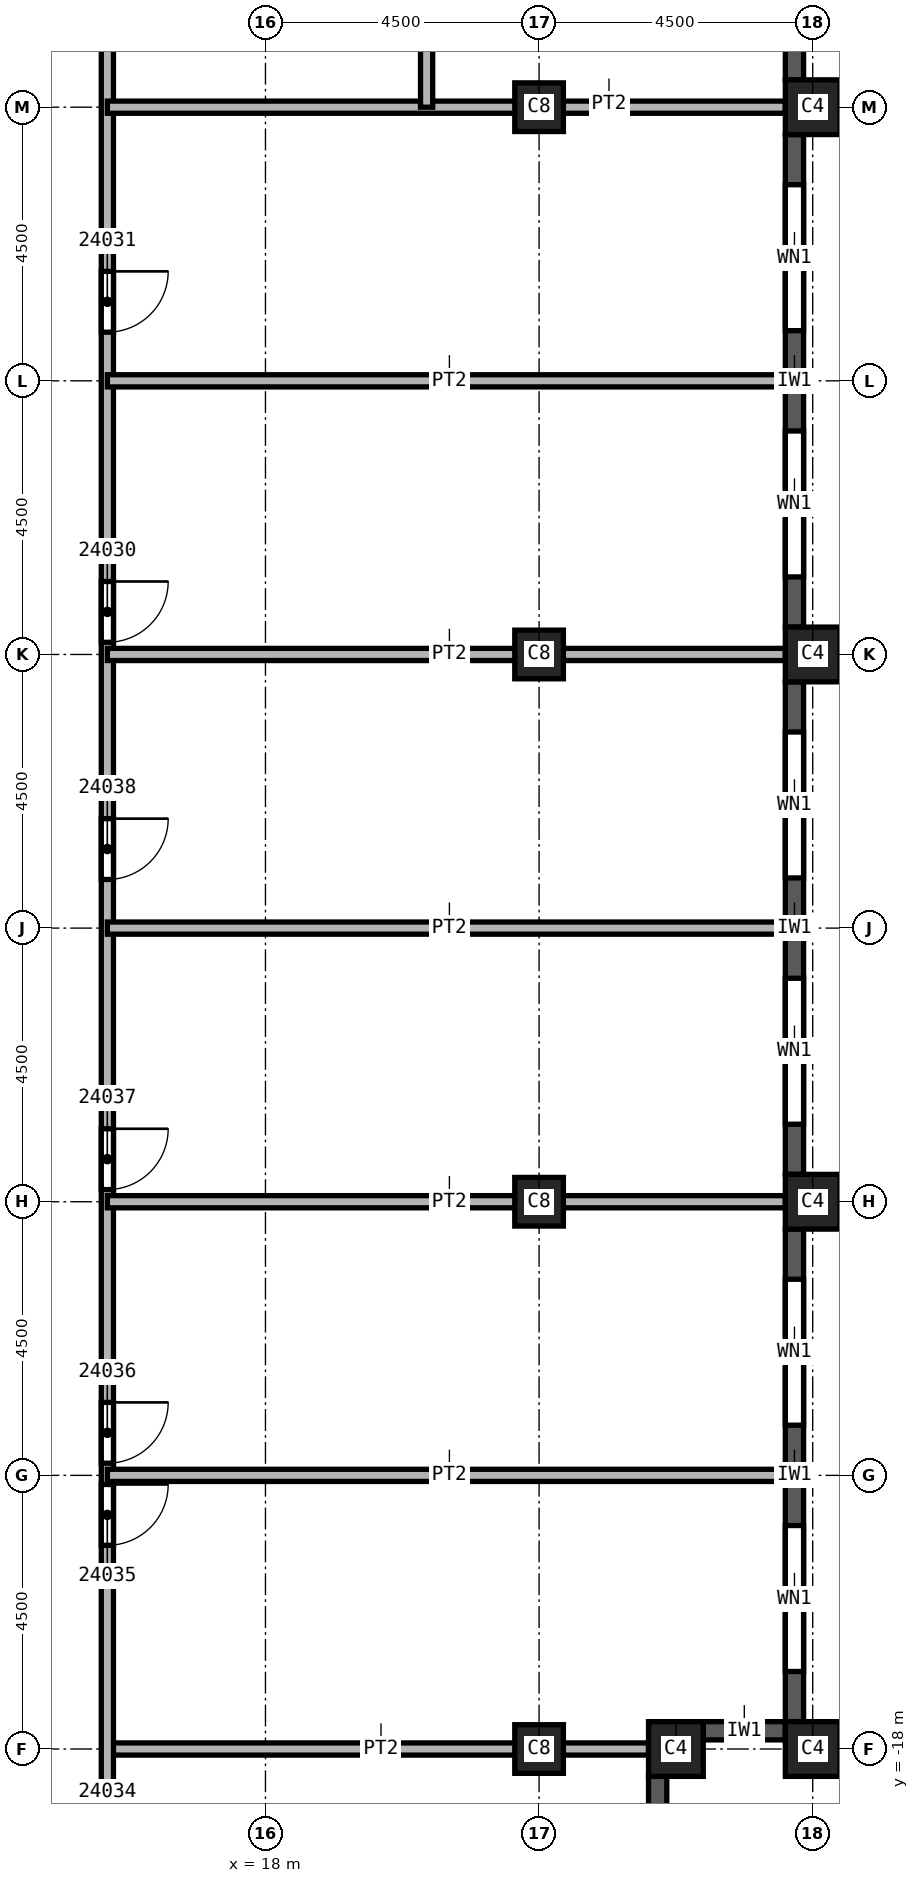
"""IFC4 building model, lengths in metres.
Left out: names, types, materials, properties, quantities, classifications, styles, units other than length and angle.
Written with IfcOpenShell. Run it as: python <this file> out.ifc"""

import sys

from ifc_helpers import new_model, si_unit, direction, frame, frame_2d, origin, origin_2d, place, context, subcontext, project, spatial, rectangle, extrude, element, fill, save


model = new_model("IFC4")
c1 = context("Model", 3, precision=1e-05, world=origin(), true_north=direction((0.0, 1.0)))
c2 = subcontext(c1, "Body", "Model", "MODEL_VIEW")
j1 = project(units=[si_unit("LENGTHUNIT", "METRE"), si_unit("PLANEANGLEUNIT", "RADIAN")], contexts=[c1])
p1 = place(None, origin())
s1 = spatial("IfcSite", under=j1, at=p1, CompositionType="ELEMENT")
p2 = place(p1, origin())
s2 = spatial("IfcBuilding", under=s1, at=p2, CompositionType="ELEMENT")
p3 = place(p2, frame((0.0, 0.0, 346.0)))
s3 = spatial("IfcBuildingStorey", under=s2, at=p3, CompositionType="ELEMENT", Elevation=346.0)
for number, where, z_axis, x_axis in (
    (1, (22.5, 0.0, 0.0), (0.0, 0.0, 1.0), (1.0, 0.0, 0.0)),
    (2, (22.5, 9.0, 0.0), (0.0, 0.0, 1.0), (1.0, 0.0, 0.0)),
    (3, (22.5, -9.0, 0.0), (0.0, 0.0, 1.0), (1.0, 0.0, 0.0)),
    (4, (22.5, -18.0, 0.0), (0.0, 0.0, 1.0), (1.0, 0.0, 0.0)),
):
    element("IfcColumn", number, at=place(p3, frame(where, z_axis=z_axis, x_axis=x_axis)), inside=s3, PredefinedType="COLUMN", context=c2, shape_type="SweptSolid", body=[
        extrude(rectangle(XDim=0.8, YDim=0.8, at=origin_2d()), origin(), (0.0, 0.0, 1.0), 3.59),
    ])
for number, where, z_axis, x_axis in (
    (5, (27.0, 0.0, 0.0), (0.0, 0.0, 1.0), (0.0, 1.0, 0.0)),
    (6, (27.0, 9.0, 0.0), (0.0, 0.0, 1.0), (0.0, 1.0, 0.0)),
    (7, (27.0, -9.0, 0.0), (0.0, 0.0, 1.0), (0.0, 1.0, 0.0)),
    (8, (27.0, -18.0, 0.0), (0.0, 0.0, 1.0), (0.0, 1.0, 0.0)),
    (9, (24.75, -18.0, 0.0), (0.0, 0.0, 1.0), (1.0, 0.0, 0.0)),
):
    element("IfcColumn", number, at=place(p3, frame(where, z_axis=z_axis, x_axis=x_axis)), inside=s3, PredefinedType="COLUMN", context=c2, shape_type="SweptSolid", body=[
        extrude(rectangle(XDim=0.9, YDim=0.9, at=origin_2d()), origin(), (0.0, 0.0, 1.0), 3.59),
    ])
p4 = place(p3, frame((24.45, -21.25, 0.0), z_axis=(0.0, 0.0, 1.0), x_axis=(0.0, 1.0, 0.0)))
e10 = element("IfcWall", 10, at=p4, inside=s3, PredefinedType="SOLIDWALL", context=c2, shape_type="SweptSolid", body=[
    extrude(rectangle(XDim=2.8, YDim=0.3, at=frame_2d((1.4, 0.0))), origin(), (0.0, 0.0, 1.0), 2.99),
])
p5 = place(p3, frame((25.2, -17.7, 0.0), z_axis=(0.0, 0.0, 1.0), x_axis=(1.0, 0.0, 0.0)))
e11 = element("IfcWall", 11, at=p5, inside=s3, PredefinedType="SOLIDWALL", context=c2, shape_type="SweptSolid", body=[
    extrude(rectangle(XDim=1.35, YDim=0.3, at=frame_2d((0.675, 0.0))), origin(), (0.0, 0.0, 1.0), 2.99),
])
p6 = place(p3, frame((26.7, -17.55, 0.0), z_axis=(0.0, 0.0, 1.0), x_axis=(0.0, 1.0, 0.0)))
e12 = element("IfcWall", 12, at=p6, inside=s3, PredefinedType="SOLIDWALL", context=c2, shape_type="SweptSolid", body=[
    extrude(rectangle(XDim=8.1, YDim=0.3, at=frame_2d((4.05, 0.0))), origin(), (0.0, 0.0, 1.0), 2.99),
])
p7 = place(p6, frame((0.825, 0.0, 0.8)))
e13 = element("IfcOpeningElement", 13, at=p7, cuts=e12, PredefinedType="OPENING", context=c2, shape_type="SweptSolid", body=[
    extrude(rectangle(XDim=2.4, YDim=1.95, at=frame_2d((1.2, 0.975))), frame((0.0, 0.15, 0.0), z_axis=(0.0, -1.0, 0.0), x_axis=(1.0, 0.0, 0.0)), (0.0, 0.0, 1.0), 0.3),
])
p8 = place(p6, frame((4.875, 0.0, 0.8)))
e14 = element("IfcOpeningElement", 14, at=p8, cuts=e12, PredefinedType="OPENING", context=c2, shape_type="SweptSolid", body=[
    extrude(rectangle(XDim=2.4, YDim=1.95, at=frame_2d((1.2, 0.975))), frame((0.0, 0.15, 0.0), z_axis=(0.0, -1.0, 0.0), x_axis=(1.0, 0.0, 0.0)), (0.0, 0.0, 1.0), 0.3),
])
p9 = place(p3, frame((26.7, -8.55, 0.0), z_axis=(0.0, 0.0, 1.0), x_axis=(0.0, 1.0, 0.0)))
e15 = element("IfcWall", 15, at=p9, inside=s3, PredefinedType="SOLIDWALL", context=c2, shape_type="SweptSolid", body=[
    extrude(rectangle(XDim=8.1, YDim=0.3, at=frame_2d((4.05, 0.0))), origin(), (0.0, 0.0, 1.0), 2.99),
])
p10 = place(p9, frame((0.825, 0.0, 0.8)))
e16 = element("IfcOpeningElement", 16, at=p10, cuts=e15, PredefinedType="OPENING", context=c2, shape_type="SweptSolid", body=[
    extrude(rectangle(XDim=2.4, YDim=1.95, at=frame_2d((1.2, 0.975))), frame((0.0, 0.15, 0.0), z_axis=(0.0, -1.0, 0.0), x_axis=(1.0, 0.0, 0.0)), (0.0, 0.0, 1.0), 0.3),
])
p11 = place(p9, frame((4.875, 0.0, 0.8)))
e17 = element("IfcOpeningElement", 17, at=p11, cuts=e15, PredefinedType="OPENING", context=c2, shape_type="SweptSolid", body=[
    extrude(rectangle(XDim=2.4, YDim=1.95, at=frame_2d((1.2, 0.975))), frame((0.0, 0.15, 0.0), z_axis=(0.0, -1.0, 0.0), x_axis=(1.0, 0.0, 0.0)), (0.0, 0.0, 1.0), 0.3),
])
p12 = place(p3, frame((26.7, 0.45, 0.0), z_axis=(0.0, 0.0, 1.0), x_axis=(0.0, 1.0, 0.0)))
e18 = element("IfcWall", 18, at=p12, inside=s3, PredefinedType="SOLIDWALL", context=c2, shape_type="SweptSolid", body=[
    extrude(rectangle(XDim=8.1, YDim=0.3, at=frame_2d((4.05, 0.0))), origin(), (0.0, 0.0, 1.0), 2.99),
])
p13 = place(p12, frame((0.825, 0.0, 0.8)))
e19 = element("IfcOpeningElement", 19, at=p13, cuts=e18, PredefinedType="OPENING", context=c2, shape_type="SweptSolid", body=[
    extrude(rectangle(XDim=2.4, YDim=1.95, at=frame_2d((1.2, 0.975))), frame((0.0, 0.15, 0.0), z_axis=(0.0, -1.0, 0.0), x_axis=(1.0, 0.0, 0.0)), (0.0, 0.0, 1.0), 0.3),
])
p14 = place(p12, frame((4.875, 0.0, 0.8)))
e20 = element("IfcOpeningElement", 20, at=p14, cuts=e18, PredefinedType="OPENING", context=c2, shape_type="SweptSolid", body=[
    extrude(rectangle(XDim=2.4, YDim=1.95, at=frame_2d((1.2, 0.975))), frame((0.0, 0.15, 0.0), z_axis=(0.0, -1.0, 0.0), x_axis=(1.0, 0.0, 0.0)), (0.0, 0.0, 1.0), 0.3),
])
p15 = place(p3, frame((26.7, 9.45, 0.0), z_axis=(0.0, 0.0, 1.0), x_axis=(0.0, 1.0, 0.0)))
e21 = element("IfcWall", 21, at=p15, inside=s3, PredefinedType="SOLIDWALL", context=c2, shape_type="SweptSolid", body=[
    extrude(rectangle(XDim=8.1, YDim=0.3, at=frame_2d((4.05, 0.0))), origin(), (0.0, 0.0, 1.0), 2.99),
])
p16 = place(p15, frame((0.825, 0.0, 0.8)))
e22 = element("IfcOpeningElement", 22, at=p16, cuts=e21, PredefinedType="OPENING", context=c2, shape_type="SweptSolid", body=[
    extrude(rectangle(XDim=2.4, YDim=1.95, at=frame_2d((1.2, 0.975))), frame((0.0, 0.15, 0.0), z_axis=(0.0, -1.0, 0.0), x_axis=(1.0, 0.0, 0.0)), (0.0, 0.0, 1.0), 0.3),
])
p17 = place(p15, frame((4.875, 0.0, 0.8)))
e23 = element("IfcOpeningElement", 23, at=p17, cuts=e21, PredefinedType="OPENING", context=c2, shape_type="SweptSolid", body=[
    extrude(rectangle(XDim=2.4, YDim=1.95, at=frame_2d((1.2, 0.975))), frame((0.0, 0.15, 0.0), z_axis=(0.0, -1.0, 0.0), x_axis=(1.0, 0.0, 0.0)), (0.0, 0.0, 1.0), 0.3),
])
p18 = place(p3, frame((15.4, -18.0, 0.0), z_axis=(0.0, 0.0, 1.0), x_axis=(1.0, 0.0, 0.0)))
e24 = element("IfcWall", 24, at=p18, inside=s3, PredefinedType="PARTITIONING", context=c2, shape_type="SweptSolid", body=[
    extrude(rectangle(XDim=8.9, YDim=0.2, at=frame_2d((4.45, 0.0))), origin(), (0.0, 0.0, 1.0), 3.59),
])
p19 = place(p3, frame((15.4, 24.95, 0.0), z_axis=(0.0, 0.0, 1.0), x_axis=(0.0, -1.0, 0.0)))
e25 = element("IfcWall", 25, at=p19, inside=s3, PredefinedType="PARTITIONING", context=c2, shape_type="SweptSolid", body=[
    extrude(rectangle(XDim=49.9, YDim=0.2, at=frame_2d((24.95, 0.0))), origin(), (0.0, 0.0, 1.0), 3.59),
])
p20 = place(p19, frame((23.75, 0.0, 0.0)))
e26 = element("IfcOpeningElement", 26, at=p20, cuts=e25, PredefinedType="OPENING", context=c2, shape_type="SweptSolid", body=[
    extrude(rectangle(XDim=1.0, YDim=2.1, at=frame_2d((0.5, 1.05))), frame((0.0, 0.1, 0.0), z_axis=(0.0, -1.0, 0.0), x_axis=(1.0, 0.0, 0.0)), (0.0, 0.0, 1.0), 0.2),
])
p21 = place(p19, frame((18.65, 0.0, 0.0)))
e27 = element("IfcOpeningElement", 27, at=p21, cuts=e25, PredefinedType="OPENING", context=c2, shape_type="SweptSolid", body=[
    extrude(rectangle(XDim=1.0, YDim=2.1, at=frame_2d((0.5, 1.05))), frame((0.0, 0.1, 0.0), z_axis=(0.0, -1.0, 0.0), x_axis=(1.0, 0.0, 0.0)), (0.0, 0.0, 1.0), 0.2),
])
p22 = place(p19, frame((7.45, 0.0, 0.0)))
e28 = element("IfcOpeningElement", 28, at=p22, cuts=e25, PredefinedType="OPENING", context=c2, shape_type="SweptSolid", body=[
    extrude(rectangle(XDim=1.0, YDim=2.1, at=frame_2d((0.5, 1.05))), frame((0.0, 0.1, 0.0), z_axis=(0.0, -1.0, 0.0), x_axis=(1.0, 0.0, 0.0)), (0.0, 0.0, 1.0), 0.2),
])
p23 = place(p19, frame((44.15, 0.0, 0.0)))
e29 = element("IfcOpeningElement", 29, at=p23, cuts=e25, PredefinedType="OPENING", context=c2, shape_type="SweptSolid", body=[
    extrude(rectangle(XDim=1.0, YDim=2.1, at=frame_2d((0.5, 1.05))), frame((0.0, 0.1, 0.0), z_axis=(0.0, -1.0, 0.0), x_axis=(1.0, 0.0, 0.0)), (0.0, 0.0, 1.0), 0.2),
])
p24 = place(p19, frame((38.6, 0.0, 0.0)))
e30 = element("IfcOpeningElement", 30, at=p24, cuts=e25, PredefinedType="OPENING", context=c2, shape_type="SweptSolid", body=[
    extrude(rectangle(XDim=1.0, YDim=2.1, at=frame_2d((0.5, 1.05))), frame((0.0, 0.1, 0.0), z_axis=(0.0, -1.0, 0.0), x_axis=(1.0, 0.0, 0.0)), (0.0, 0.0, 1.0), 0.2),
])
p25 = place(p19, frame((37.25, 0.0, 0.0)))
e31 = element("IfcOpeningElement", 31, at=p25, cuts=e25, PredefinedType="OPENING", context=c2, shape_type="SweptSolid", body=[
    extrude(rectangle(XDim=1.0, YDim=2.1, at=frame_2d((0.5, 1.05))), frame((0.0, 0.1, 0.0), z_axis=(0.0, -1.0, 0.0), x_axis=(1.0, 0.0, 0.0)), (0.0, 0.0, 1.0), 0.2),
])
p26 = place(p19, frame((32.75, 0.0, 0.0)))
e32 = element("IfcOpeningElement", 32, at=p26, cuts=e25, PredefinedType="OPENING", context=c2, shape_type="SweptSolid", body=[
    extrude(rectangle(XDim=1.0, YDim=2.1, at=frame_2d((0.5, 1.05))), frame((0.0, 0.1, 0.0), z_axis=(0.0, -1.0, 0.0), x_axis=(1.0, 0.0, 0.0)), (0.0, 0.0, 1.0), 0.2),
])
p27 = place(p19, frame((27.65, 0.0, 0.0)))
e33 = element("IfcOpeningElement", 33, at=p27, cuts=e25, PredefinedType="OPENING", context=c2, shape_type="SweptSolid", body=[
    extrude(rectangle(XDim=1.0, YDim=2.1, at=frame_2d((0.5, 1.05))), frame((0.0, 0.1, 0.0), z_axis=(0.0, -1.0, 0.0), x_axis=(1.0, 0.0, 0.0)), (0.0, 0.0, 1.0), 0.2),
])
for number, where, z_axis, x_axis in (
    (34, (15.4, -13.5, 0.0), (0.0, 0.0, 1.0), (1.0, 0.0, 0.0)),
    (35, (15.4, -9.0, 0.0), (0.0, 0.0, 1.0), (1.0, 0.0, 0.0)),
    (36, (15.4, -4.5, 0.0), (0.0, 0.0, 1.0), (1.0, 0.0, 0.0)),
    (37, (15.4, 4.5, 0.0), (0.0, 0.0, 1.0), (1.0, 0.0, 0.0)),
    (38, (15.4, 9.0, 0.0), (0.0, 0.0, 1.0), (1.0, 0.0, 0.0)),
):
    element("IfcWall", number, at=place(p3, frame(where, z_axis=z_axis, x_axis=x_axis)), inside=s3, PredefinedType="PARTITIONING", context=c2, shape_type="SweptSolid", body=[
        extrude(rectangle(XDim=11.15, YDim=0.2, at=frame_2d((5.575, 0.0))), origin(), (0.0, 0.0, 1.0), 3.59),
    ])
p28 = place(p3, frame((20.65, 24.95, 0.0), z_axis=(0.0, 0.0, 1.0), x_axis=(0.0, -1.0, 0.0)))
e39 = element("IfcWall", 39, at=p28, inside=s3, PredefinedType="PARTITIONING", context=c2, shape_type="SweptSolid", body=[
    extrude(rectangle(XDim=15.95, YDim=0.2, at=frame_2d((7.975, 0.0))), origin(), (0.0, 0.0, 1.0), 3.59),
])
p29 = place(p28, frame((7.75, 0.0, 0.0)))
e40 = element("IfcOpeningElement", 40, at=p29, cuts=e39, PredefinedType="OPENING", context=c2, shape_type="SweptSolid", body=[
    extrude(rectangle(XDim=1.0, YDim=2.1, at=frame_2d((0.5, 1.05))), frame((0.0, 0.1, 0.0), z_axis=(0.0, -1.0, 0.0), x_axis=(1.0, 0.0, 0.0)), (0.0, 0.0, 1.0), 0.2),
])
p30 = place(p3, frame((26.55, 0.0, 0.0), z_axis=(0.0, 0.0, 1.0), x_axis=(-1.0, 0.0, 0.0)))
e41 = element("IfcWall", 41, at=p30, inside=s3, PredefinedType="PARTITIONING", context=c2, shape_type="SweptSolid", body=[
    extrude(rectangle(XDim=11.15, YDim=0.2, at=frame_2d((5.575, 0.0))), origin(), (0.0, 0.0, 1.0), 3.59),
])
p31 = place(p7, origin())
e42 = element("IfcWindow", 42, at=p31, inside=s3, PartitioningType="SINGLE_PANEL", PredefinedType="WINDOW", context=c2, shape_type="SweptSolid", body=[
    extrude(rectangle(XDim=2.4, YDim=1.95, at=frame_2d((1.2, 0.975))), frame((0.0, 0.03, 0.0), z_axis=(0.0, -1.0, 0.0), x_axis=(1.0, 0.0, 0.0)), (0.0, 0.0, 1.0), 0.06),
])
fill(e13, e42)
p32 = place(p8, origin())
e43 = element("IfcWindow", 43, at=p32, inside=s3, PartitioningType="SINGLE_PANEL", PredefinedType="WINDOW", context=c2, shape_type="SweptSolid", body=[
    extrude(rectangle(XDim=2.4, YDim=1.95, at=frame_2d((1.2, 0.975))), frame((0.0, 0.03, 0.0), z_axis=(0.0, -1.0, 0.0), x_axis=(1.0, 0.0, 0.0)), (0.0, 0.0, 1.0), 0.06),
])
fill(e14, e43)
p33 = place(p10, origin())
e44 = element("IfcWindow", 44, at=p33, inside=s3, PartitioningType="SINGLE_PANEL", PredefinedType="WINDOW", context=c2, shape_type="SweptSolid", body=[
    extrude(rectangle(XDim=2.4, YDim=1.95, at=frame_2d((1.2, 0.975))), frame((0.0, 0.03, 0.0), z_axis=(0.0, -1.0, 0.0), x_axis=(1.0, 0.0, 0.0)), (0.0, 0.0, 1.0), 0.06),
])
fill(e16, e44)
p34 = place(p11, origin())
e45 = element("IfcWindow", 45, at=p34, inside=s3, PartitioningType="SINGLE_PANEL", PredefinedType="WINDOW", context=c2, shape_type="SweptSolid", body=[
    extrude(rectangle(XDim=2.4, YDim=1.95, at=frame_2d((1.2, 0.975))), frame((0.0, 0.03, 0.0), z_axis=(0.0, -1.0, 0.0), x_axis=(1.0, 0.0, 0.0)), (0.0, 0.0, 1.0), 0.06),
])
fill(e17, e45)
p35 = place(p13, origin())
e46 = element("IfcWindow", 46, at=p35, inside=s3, PartitioningType="SINGLE_PANEL", PredefinedType="WINDOW", context=c2, shape_type="SweptSolid", body=[
    extrude(rectangle(XDim=2.4, YDim=1.95, at=frame_2d((1.2, 0.975))), frame((0.0, 0.03, 0.0), z_axis=(0.0, -1.0, 0.0), x_axis=(1.0, 0.0, 0.0)), (0.0, 0.0, 1.0), 0.06),
])
fill(e19, e46)
p36 = place(p14, origin())
e47 = element("IfcWindow", 47, at=p36, inside=s3, PartitioningType="SINGLE_PANEL", PredefinedType="WINDOW", context=c2, shape_type="SweptSolid", body=[
    extrude(rectangle(XDim=2.4, YDim=1.95, at=frame_2d((1.2, 0.975))), frame((0.0, 0.03, 0.0), z_axis=(0.0, -1.0, 0.0), x_axis=(1.0, 0.0, 0.0)), (0.0, 0.0, 1.0), 0.06),
])
fill(e20, e47)
p37 = place(p20, origin())
e48 = element("IfcDoor", 48, at=p37, inside=s3, OperationType="SINGLE_SWING_LEFT", PredefinedType="DOOR", context=c2, shape_type="SweptSolid", body=[
    extrude(rectangle(XDim=1.0, YDim=2.1, at=frame_2d((0.5, 1.05))), frame((0.0, 0.025, 0.0), z_axis=(0.0, -1.0, 0.0), x_axis=(1.0, 0.0, 0.0)), (0.0, 0.0, 1.0), 0.05),
])
fill(e26, e48)
p38 = place(p21, origin())
e49 = element("IfcDoor", 49, at=p38, inside=s3, OperationType="SINGLE_SWING_RIGHT", PredefinedType="DOOR", context=c2, shape_type="SweptSolid", body=[
    extrude(rectangle(XDim=1.0, YDim=2.1, at=frame_2d((0.5, 1.05))), frame((0.0, 0.025, 0.0), z_axis=(0.0, -1.0, 0.0), x_axis=(1.0, 0.0, 0.0)), (0.0, 0.0, 1.0), 0.05),
])
fill(e27, e49)
p39 = place(p24, origin())
e50 = element("IfcDoor", 50, at=p39, inside=s3, OperationType="SINGLE_SWING_RIGHT", PredefinedType="DOOR", context=c2, shape_type="SweptSolid", body=[
    extrude(rectangle(XDim=1.0, YDim=2.1, at=frame_2d((0.5, 1.05))), frame((0.0, 0.025, 0.0), z_axis=(0.0, -1.0, 0.0), x_axis=(1.0, 0.0, 0.0)), (0.0, 0.0, 1.0), 0.05),
])
fill(e30, e50)
p40 = place(p25, origin())
e51 = element("IfcDoor", 51, at=p40, inside=s3, OperationType="SINGLE_SWING_LEFT", PredefinedType="DOOR", context=c2, shape_type="SweptSolid", body=[
    extrude(rectangle(XDim=1.0, YDim=2.1, at=frame_2d((0.5, 1.05))), frame((0.0, 0.025, 0.0), z_axis=(0.0, -1.0, 0.0), x_axis=(1.0, 0.0, 0.0)), (0.0, 0.0, 1.0), 0.05),
])
fill(e31, e51)
p41 = place(p26, origin())
e52 = element("IfcDoor", 52, at=p41, inside=s3, OperationType="SINGLE_SWING_RIGHT", PredefinedType="DOOR", context=c2, shape_type="SweptSolid", body=[
    extrude(rectangle(XDim=1.0, YDim=2.1, at=frame_2d((0.5, 1.05))), frame((0.0, 0.025, 0.0), z_axis=(0.0, -1.0, 0.0), x_axis=(1.0, 0.0, 0.0)), (0.0, 0.0, 1.0), 0.05),
])
fill(e32, e52)
p42 = place(p27, origin())
e53 = element("IfcDoor", 53, at=p42, inside=s3, OperationType="SINGLE_SWING_LEFT", PredefinedType="DOOR", context=c2, shape_type="SweptSolid", body=[
    extrude(rectangle(XDim=1.0, YDim=2.1, at=frame_2d((0.5, 1.05))), frame((0.0, 0.025, 0.0), z_axis=(0.0, -1.0, 0.0), x_axis=(1.0, 0.0, 0.0)), (0.0, 0.0, 1.0), 0.05),
])
fill(e33, e53)
save(model, sys.argv[1])
